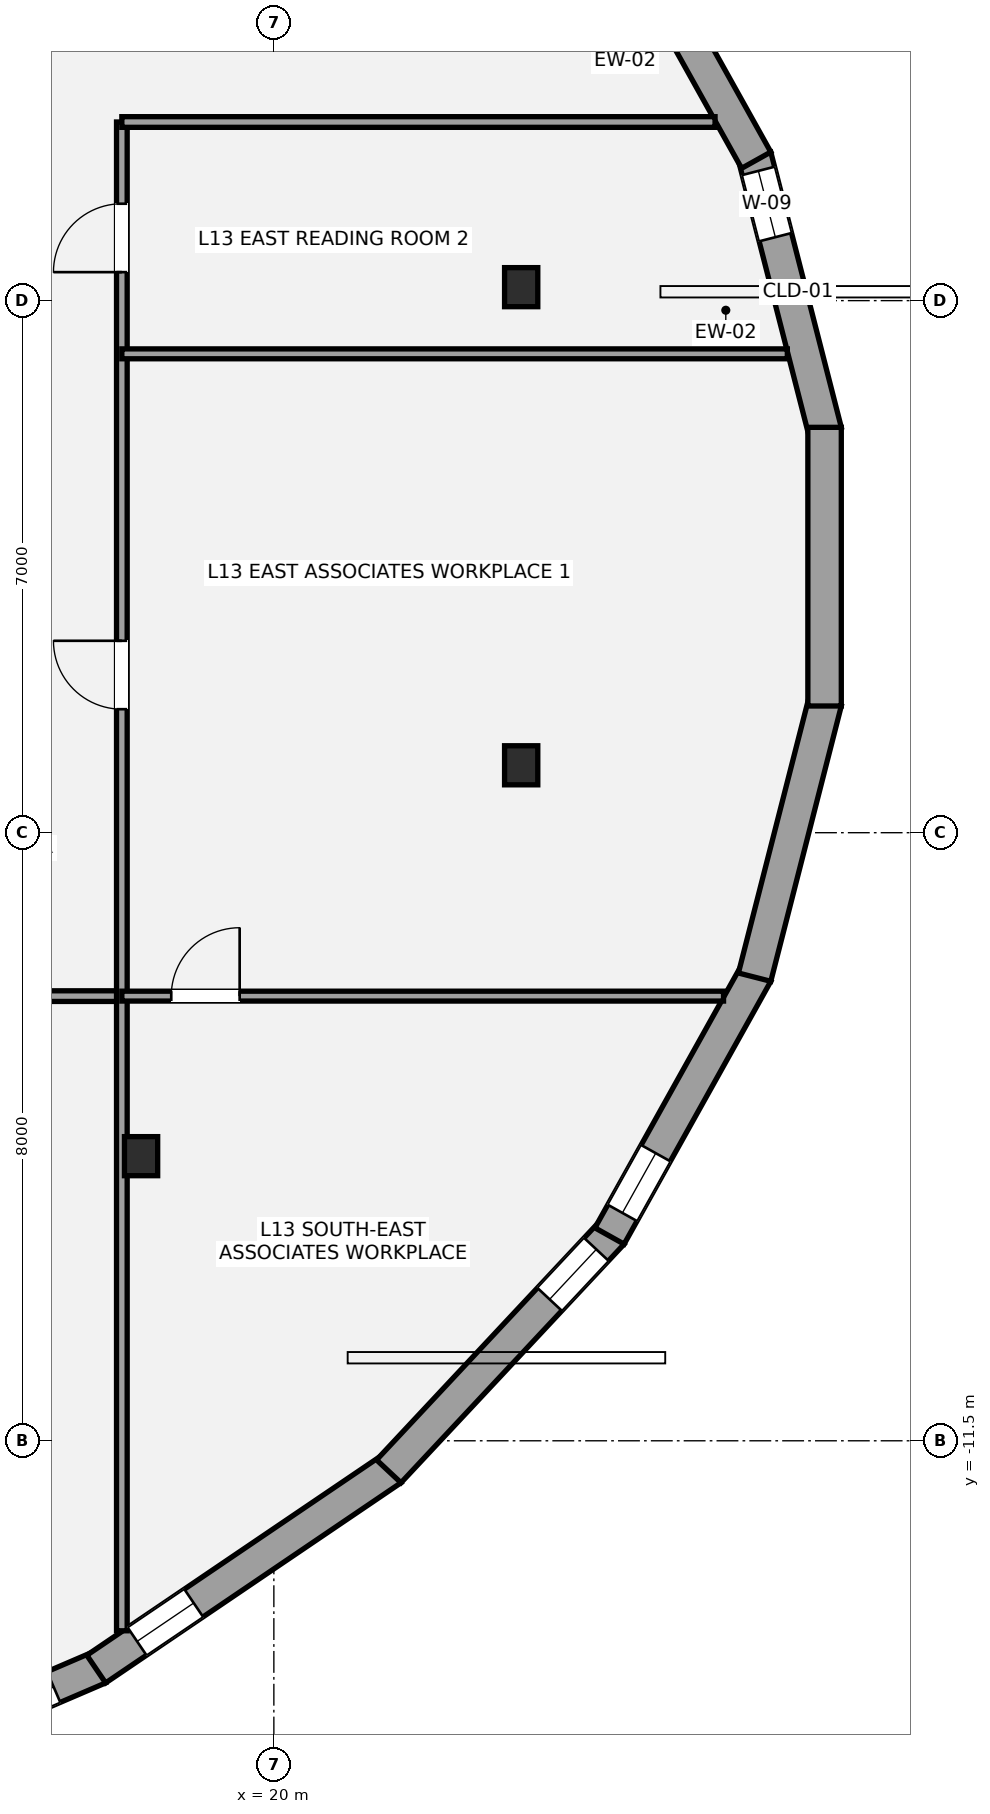
"""IFC4 building model, lengths in metres.
Left out: names, types, materials, properties, quantities, classifications, styles, units other than length and angle.
Written with IfcOpenShell. Run it as: python <this file> out.ifc"""

import sys

from ifc_helpers import new_model, si_unit, direction, frame, frame_2d, origin, origin_2d, place, context, subcontext, project, spatial, rectangle, i_section, extrude, element, fill, save


model = new_model("IFC4")
c1 = context("Model", 3, precision=1e-05, world=origin(), true_north=direction((0.0, 1.0)))
c2 = subcontext(c1, "Body", "Model", "MODEL_VIEW")
j1 = project(units=[si_unit("LENGTHUNIT", "METRE"), si_unit("PLANEANGLEUNIT", "RADIAN")], contexts=[c1])
p1 = place(None, origin())
s1 = spatial("IfcSite", under=j1, at=p1, CompositionType="ELEMENT")
p2 = place(p1, origin())
s2 = spatial("IfcBuilding", under=s1, at=p2, CompositionType="ELEMENT")
p3 = place(p2, frame((0.0, 0.0, 52.2)))
s3 = spatial("IfcBuildingStorey", under=s2, at=p3, CompositionType="ELEMENT", Elevation=52.2)
for number, where, z_axis, x_axis in (
    (1, (23.254, 3.677, 0.0), (0.0, 0.0, 1.0), (1.0, 0.0, 0.0)),
    (2, (18.253, -7.756, 0.0), (0.0, 0.0, 1.0), (1.0, 0.0, 0.0)),
    (3, (23.254, -2.613, 0.0), (0.0, 0.0, 1.0), (1.0, 0.0, 0.0)),
):
    element("IfcColumn", number, at=place(p3, frame(where, z_axis=z_axis, x_axis=x_axis)), inside=s3, PredefinedType="COLUMN", context=c2, shape_type="SweptSolid", body=[
        extrude(i_section(OverallWidth=0.437, OverallDepth=0.514, WebThickness=0.061, FlangeThickness=0.097, at=origin_2d()), origin(), (0.0, 0.0, 1.0), 3.6),
    ])
p4 = place(p3, frame((26.325, 5.4, 0.0), z_axis=(0.0, 0.0, 1.0), x_axis=(0.248062710061, -0.968743976434, 0.0)))
e4 = element("IfcWall", 4, at=p4, inside=s3, PredefinedType="STANDARD", context=c2, shape_type="SweptSolid", body=[
    extrude(rectangle(XDim=3.739, YDim=0.44, at=frame_2d((1.87, 0.0))), origin(), (0.0, 0.0, 1.0), 2.533),
])
p5 = place(p4, frame((0.2, 0.0, 0.58)))
e5 = element("IfcOpeningElement", 5, at=p5, cuts=e4, PredefinedType="OPENING", context=c2, shape_type="SweptSolid", body=[
    extrude(rectangle(XDim=0.9, YDim=1.35, at=frame_2d((0.45, 0.675))), frame((0.0, 0.23, 0.0), z_axis=(0.0, -1.0, 0.0), x_axis=(1.0, 0.0, 0.0)), (0.0, 0.0, 1.0), 0.46),
])
p6 = place(p3, frame((24.416, 8.806, 0.0), z_axis=(0.0, 0.0, 1.0), x_axis=(0.487369438963, -0.873195871477, 0.0)))
e6 = element("IfcWall", 6, at=p6, inside=s3, PredefinedType="STANDARD", context=c2, shape_type="SweptSolid", body=[
    extrude(rectangle(XDim=3.96, YDim=0.44, at=frame_2d((1.98, 0.0))), origin(), (0.0, 0.0, 1.0), 2.533),
])
p7 = place(p6, frame((0.249, 0.0, 0.92)))
e7 = element("IfcOpeningElement", 7, at=p7, cuts=e6, PredefinedType="OPENING", context=c2, shape_type="SweptSolid", body=[
    extrude(rectangle(XDim=0.9, YDim=1.35, at=frame_2d((0.45, 0.675))), frame((0.0, 0.23, 0.0), z_axis=(0.0, -1.0, 0.0), x_axis=(1.0, 0.0, 0.0)), (0.0, 0.0, 1.0), 0.46),
])
p8 = place(p3, frame((17.7, -14.483, 0.0), z_axis=(0.0, 0.0, 1.0), x_axis=(-0.918881850071, -0.394532819433, 0.0)))
e8 = element("IfcWall", 8, at=p8, inside=s3, PredefinedType="STANDARD", context=c2, shape_type="SweptSolid", body=[
    extrude(rectangle(XDim=5.042, YDim=0.44, at=frame_2d((2.521, 0.0))), origin(), (0.0, 0.0, 1.0), 2.533),
])
p9 = place(p8, frame((0.649, 0.0, 0.58)))
e9 = element("IfcOpeningElement", 9, at=p9, cuts=e8, PredefinedType="OPENING", context=c2, shape_type="SweptSolid", body=[
    extrude(rectangle(XDim=0.9, YDim=1.35, at=frame_2d((0.45, 0.675))), frame((0.0, 0.23, 0.0), z_axis=(0.0, -1.0, 0.0), x_axis=(1.0, 0.0, 0.0)), (0.0, 0.0, 1.0), 0.46),
])
p10 = place(p3, frame((21.549, -11.87, 0.0), z_axis=(0.0, 0.0, 1.0), x_axis=(-0.827825981515, -0.560984976919, 0.0)))
e10 = element("IfcWall", 10, at=p10, inside=s3, PredefinedType="STANDARD", context=c2, shape_type="SweptSolid", body=[
    extrude(rectangle(XDim=4.695, YDim=0.44, at=frame_2d((2.347, 0.0))), origin(), (0.0, 0.0, 1.0), 2.533),
])
p11 = place(p10, frame((3.145, 0.0, 0.58)))
e11 = element("IfcOpeningElement", 11, at=p11, cuts=e10, PredefinedType="OPENING", context=c2, shape_type="SweptSolid", body=[
    extrude(rectangle(XDim=0.9, YDim=1.35, at=frame_2d((0.45, 0.675))), frame((0.0, 0.23, 0.0), z_axis=(0.0, -1.0, 0.0), x_axis=(1.0, 0.0, 0.0)), (0.0, 0.0, 1.0), 0.46),
])
p12 = place(p3, frame((24.448, -8.763, 0.0), z_axis=(0.0, 0.0, 1.0), x_axis=(-0.68299392258, -0.730424056093, 0.0)))
e12 = element("IfcWall", 12, at=p12, inside=s3, PredefinedType="STANDARD", context=c2, shape_type="SweptSolid", body=[
    extrude(rectangle(XDim=4.298, YDim=0.44, at=frame_2d((2.149, 0.0))), origin(), (0.0, 0.0, 1.0), 2.533),
])
p13 = place(p12, frame((0.3, 0.0, 0.58)))
e13 = element("IfcOpeningElement", 13, at=p13, cuts=e12, PredefinedType="OPENING", context=c2, shape_type="SweptSolid", body=[
    extrude(rectangle(XDim=0.9, YDim=1.35, at=frame_2d((0.45, 0.675))), frame((0.0, 0.23, 0.0), z_axis=(0.0, -1.0, 0.0), x_axis=(1.0, 0.0, 0.0)), (0.0, 0.0, 1.0), 0.46),
])
p14 = place(p3, frame((26.346, -5.348, 0.0), z_axis=(0.0, 0.0, 1.0), x_axis=(-0.487369438963, -0.873195871477, 0.0)))
e14 = element("IfcWall", 14, at=p14, inside=s3, PredefinedType="STANDARD", context=c2, shape_type="SweptSolid", body=[
    extrude(rectangle(XDim=3.96, YDim=0.44, at=frame_2d((1.98, 0.0))), origin(), (0.0, 0.0, 1.0), 2.533),
])
p15 = place(p14, frame((2.712, 0.0, 0.58)))
e15 = element("IfcOpeningElement", 15, at=p15, cuts=e14, PredefinedType="OPENING", context=c2, shape_type="SweptSolid", body=[
    extrude(rectangle(XDim=0.9, YDim=1.35, at=frame_2d((0.45, 0.675))), frame((0.0, 0.23, 0.0), z_axis=(0.0, -1.0, 0.0), x_axis=(1.0, 0.0, 0.0)), (0.0, 0.0, 1.0), 0.46),
])
p16 = place(p3, frame((27.253, -1.778, 0.0), z_axis=(0.0, 0.0, 1.0), x_axis=(-0.248062710061, -0.968743976434, 0.0)))
e16 = element("IfcWall", 16, at=p16, inside=s3, PredefinedType="STANDARD", context=c2, shape_type="SweptSolid", body=[
    extrude(rectangle(XDim=3.739, YDim=0.44, at=frame_2d((1.87, 0.0))), origin(), (0.0, 0.0, 1.0), 2.533),
])
p17 = place(p3, frame((27.246, 1.833, 0.0), z_axis=(0.0, 0.0, 1.0), x_axis=(0.0, -1.0, 0.0)))
e17 = element("IfcWall", 17, at=p17, inside=s3, PredefinedType="STANDARD", context=c2, shape_type="SweptSolid", body=[
    extrude(rectangle(XDim=3.666, YDim=0.44, at=frame_2d((1.833, 0.0))), origin(), (0.0, 0.0, 1.0), 2.533),
])
p18 = place(p3, frame((-16.1, -5.65, 0.0), z_axis=(0.0, 0.0, 1.0), x_axis=(1.0, 0.0, 0.0)))
e18 = element("IfcWall", 18, at=p18, inside=s3, PredefinedType="PARTITIONING", context=c2, shape_type="SweptSolid", body=[
    extrude(rectangle(XDim=34.1, YDim=0.14, at=frame_2d((17.05, 0.0))), origin(), (0.0, 0.0, 1.0), 3.4),
])
p19 = place(p18, frame((5.35, 0.0, 0.0)))
e19 = element("IfcOpeningElement", 19, at=p19, cuts=e18, PredefinedType="OPENING", context=c2, shape_type="SweptSolid", body=[
    extrude(rectangle(XDim=0.9, YDim=2.1, at=frame_2d((0.45, 1.05))), frame((0.0, 0.08, 0.0), z_axis=(0.0, -1.0, 0.0), x_axis=(1.0, 0.0, 0.0)), (0.0, 0.0, 1.0), 0.16),
])
p20 = place(p18, frame((15.85, 0.0, 0.0)))
e20 = element("IfcOpeningElement", 20, at=p20, cuts=e18, PredefinedType="OPENING", context=c2, shape_type="SweptSolid", body=[
    extrude(rectangle(XDim=1.5, YDim=2.15, at=frame_2d((0.75, 1.075))), frame((0.0, 0.08, 0.0), z_axis=(0.0, -1.0, 0.0), x_axis=(1.0, 0.0, 0.0)), (0.0, 0.0, 1.0), 0.16),
])
p21 = place(p18, frame((27.4, 0.0, 0.0)))
e21 = element("IfcOpeningElement", 21, at=p21, cuts=e18, PredefinedType="OPENING", context=c2, shape_type="SweptSolid", body=[
    extrude(rectangle(XDim=0.9, YDim=2.1, at=frame_2d((0.45, 1.05))), frame((0.0, 0.08, 0.0), z_axis=(0.0, -1.0, 0.0), x_axis=(1.0, 0.0, 0.0)), (0.0, 0.0, 1.0), 0.16),
])
p22 = place(p3, frame((18.0, -14.0, 0.0), z_axis=(0.0, 0.0, 1.0), x_axis=(0.0, 1.0, 0.0)))
e22 = element("IfcWall", 22, at=p22, inside=s3, PredefinedType="PARTITIONING", context=c2, shape_type="SweptSolid", body=[
    extrude(rectangle(XDim=19.85, YDim=0.14, at=frame_2d((9.925, 0.0))), origin(), (0.0, 0.0, 1.0), 2.841),
])
p23 = place(p22, frame((12.125, 0.0, 0.0)))
e23 = element("IfcOpeningElement", 23, at=p23, cuts=e22, PredefinedType="OPENING", context=c2, shape_type="SweptSolid", body=[
    extrude(rectangle(XDim=0.9, YDim=2.1, at=frame_2d((0.45, 1.05))), frame((0.0, 0.08, 0.0), z_axis=(0.0, -1.0, 0.0), x_axis=(1.0, 0.0, 0.0)), (0.0, 0.0, 1.0), 0.16),
])
p24 = place(p22, frame((17.875, 0.0, 0.0)))
e24 = element("IfcOpeningElement", 24, at=p24, cuts=e22, PredefinedType="OPENING", context=c2, shape_type="SweptSolid", body=[
    extrude(rectangle(XDim=0.9, YDim=2.1, at=frame_2d((0.45, 1.05))), frame((0.0, 0.08, 0.0), z_axis=(0.0, -1.0, 0.0), x_axis=(1.0, 0.0, 0.0)), (0.0, 0.0, 1.0), 0.16),
])
p25 = place(p3, frame((18.0, 5.85, 0.0), z_axis=(0.0, 0.0, 1.0), x_axis=(1.0, 0.0, 0.0)))
e25 = element("IfcWall", 25, at=p25, inside=s3, PredefinedType="PARTITIONING", context=c2, shape_type="SweptSolid", body=[
    extrude(rectangle(XDim=7.805, YDim=0.14, at=frame_2d((3.902, 0.0))), origin(), (0.0, 0.0, 1.0), 2.853),
])
p26 = place(p3, frame((18.0, -5.65, 0.0), z_axis=(0.0, 0.0, 1.0), x_axis=(1.0, 0.0, 0.0)))
e26 = element("IfcWall", 26, at=p26, inside=s3, PredefinedType="PARTITIONING", context=c2, shape_type="SweptSolid", body=[
    extrude(rectangle(XDim=7.917, YDim=0.13, at=frame_2d((3.958, 0.0))), origin(), (0.0, 0.0, 1.0), 2.779),
])
p27 = place(p26, frame((0.65, 0.0, 0.0)))
e27 = element("IfcOpeningElement", 27, at=p27, cuts=e26, PredefinedType="OPENING", context=c2, shape_type="SweptSolid", body=[
    extrude(rectangle(XDim=0.9, YDim=2.1, at=frame_2d((0.45, 1.05))), frame((0.0, 0.075, 0.0), z_axis=(0.0, -1.0, 0.0), x_axis=(1.0, 0.0, 0.0)), (0.0, 0.0, 1.0), 0.15),
])
p28 = place(p3, frame((18.0, 2.8, 0.0), z_axis=(0.0, 0.0, 1.0), x_axis=(1.0, 0.0, 0.0)))
e28 = element("IfcWall", 28, at=p28, inside=s3, PredefinedType="PARTITIONING", context=c2, shape_type="SweptSolid", body=[
    extrude(rectangle(XDim=8.756, YDim=0.13, at=frame_2d((4.378, 0.0))), origin(), (0.0, 0.0, 1.0), 2.841),
])
p29 = place(p5, origin())
e29 = element("IfcWindow", 29, at=p29, inside=s3, PartitioningType="SINGLE_PANEL", PredefinedType="WINDOW", context=c2, shape_type="SweptSolid", body=[
    extrude(rectangle(XDim=0.9, YDim=1.35, at=frame_2d((0.45, 0.675))), frame((0.0, -0.01, 0.0), z_axis=(0.0, -1.0, 0.0), x_axis=(1.0, 0.0, 0.0)), (0.0, 0.0, 1.0), 0.06),
])
fill(e5, e29)
p30 = place(p9, origin())
e30 = element("IfcWindow", 30, at=p30, inside=s3, PartitioningType="SINGLE_PANEL", PredefinedType="WINDOW", context=c2, shape_type="SweptSolid", body=[
    extrude(rectangle(XDim=0.9, YDim=1.35, at=frame_2d((0.45, 0.675))), frame((0.0, -0.01, 0.0), z_axis=(0.0, -1.0, 0.0), x_axis=(1.0, 0.0, 0.0)), (0.0, 0.0, 1.0), 0.06),
])
fill(e9, e30)
p31 = place(p11, origin())
e31 = element("IfcWindow", 31, at=p31, inside=s3, PartitioningType="SINGLE_PANEL", PredefinedType="WINDOW", context=c2, shape_type="SweptSolid", body=[
    extrude(rectangle(XDim=0.9, YDim=1.35, at=frame_2d((0.45, 0.675))), frame((0.0, -0.01, 0.0), z_axis=(0.0, -1.0, 0.0), x_axis=(1.0, 0.0, 0.0)), (0.0, 0.0, 1.0), 0.06),
])
fill(e11, e31)
p32 = place(p13, origin())
e32 = element("IfcWindow", 32, at=p32, inside=s3, PartitioningType="SINGLE_PANEL", PredefinedType="WINDOW", context=c2, shape_type="SweptSolid", body=[
    extrude(rectangle(XDim=0.9, YDim=1.35, at=frame_2d((0.45, 0.675))), frame((0.0, -0.01, 0.0), z_axis=(0.0, -1.0, 0.0), x_axis=(1.0, 0.0, 0.0)), (0.0, 0.0, 1.0), 0.06),
])
fill(e13, e32)
p33 = place(p15, origin())
e33 = element("IfcWindow", 33, at=p33, inside=s3, PartitioningType="SINGLE_PANEL", PredefinedType="WINDOW", context=c2, shape_type="SweptSolid", body=[
    extrude(rectangle(XDim=0.9, YDim=1.35, at=frame_2d((0.45, 0.675))), frame((0.0, -0.01, 0.0), z_axis=(0.0, -1.0, 0.0), x_axis=(1.0, 0.0, 0.0)), (0.0, 0.0, 1.0), 0.06),
])
fill(e15, e33)
p34 = place(p27, origin())
e34 = element("IfcDoor", 34, at=p34, inside=s3, OperationType="SINGLE_SWING_RIGHT", PredefinedType="DOOR", context=c2, shape_type="SweptSolid", body=[
    extrude(rectangle(XDim=0.9, YDim=2.1, at=frame_2d((0.45, 1.05))), frame((0.0, 0.025, 0.0), z_axis=(0.0, -1.0, 0.0), x_axis=(1.0, 0.0, 0.0)), (0.0, 0.0, 1.0), 0.05),
])
fill(e27, e34)
p35 = place(p23, origin())
e35 = element("IfcDoor", 35, at=p35, inside=s3, OperationType="SINGLE_SWING_RIGHT", PredefinedType="DOOR", context=c2, shape_type="SweptSolid", body=[
    extrude(rectangle(XDim=0.9, YDim=2.1, at=frame_2d((0.45, 1.05))), frame((0.0, 0.025, 0.0), z_axis=(0.0, -1.0, 0.0), x_axis=(1.0, 0.0, 0.0)), (0.0, 0.0, 1.0), 0.05),
])
fill(e23, e35)
p36 = place(p24, origin())
e36 = element("IfcDoor", 36, at=p36, inside=s3, OperationType="SINGLE_SWING_LEFT", PredefinedType="DOOR", context=c2, shape_type="SweptSolid", body=[
    extrude(rectangle(XDim=0.9, YDim=2.1, at=frame_2d((0.45, 1.05))), frame((0.0, 0.025, 0.0), z_axis=(0.0, -1.0, 0.0), x_axis=(1.0, 0.0, 0.0)), (0.0, 0.0, 1.0), 0.05),
])
fill(e24, e36)
save(model, sys.argv[1])
